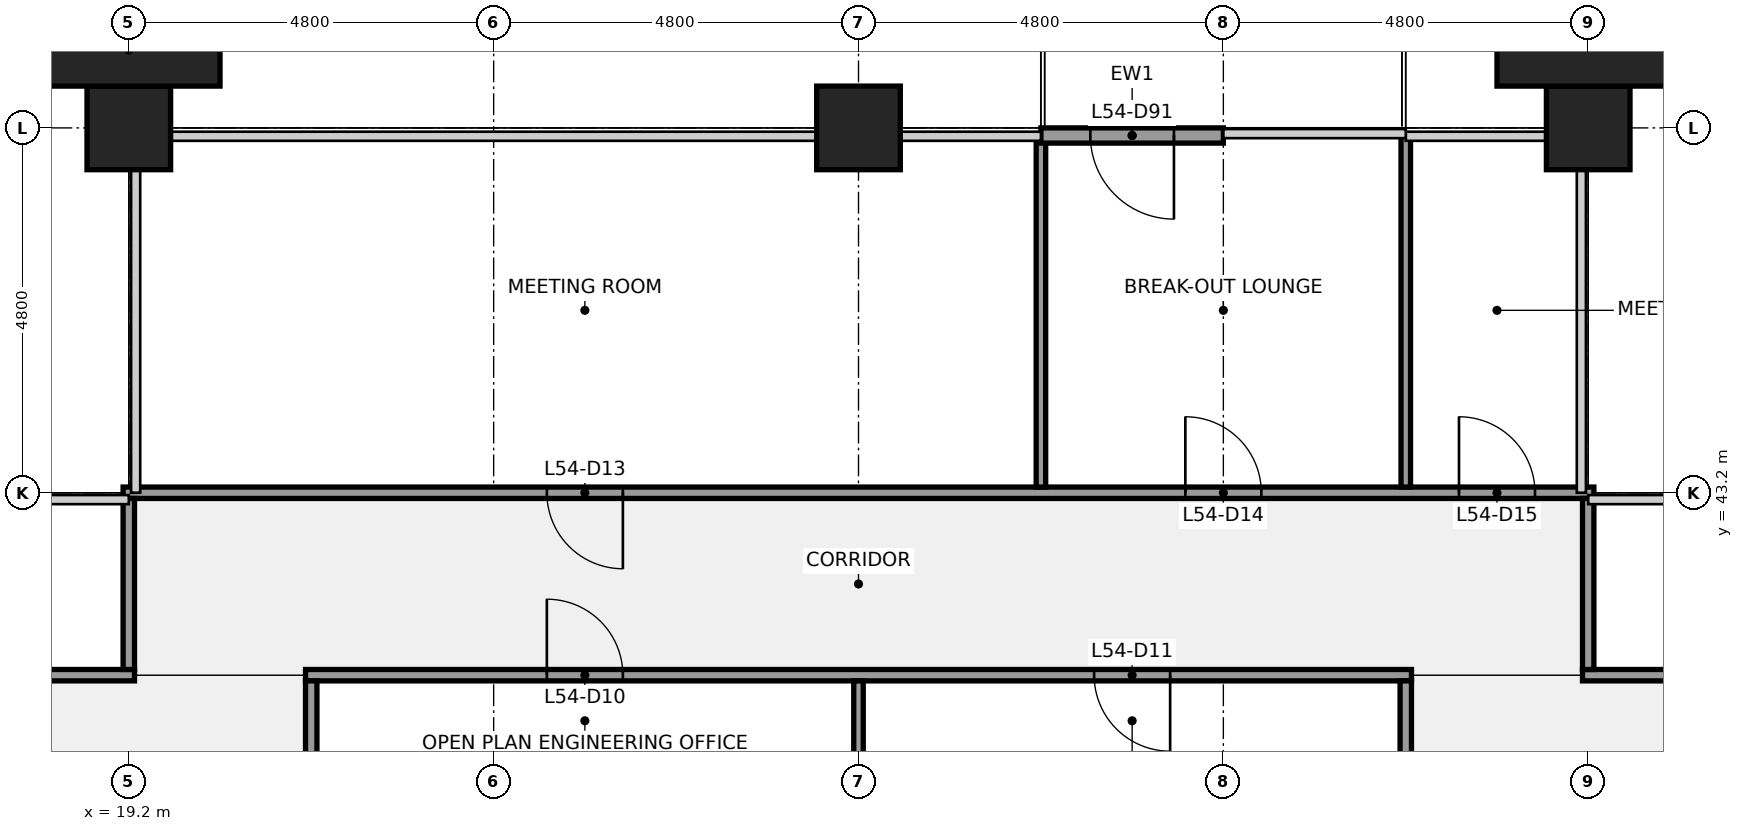
"""IFC4 building model, lengths in metres.
Left out: names, types, materials, properties, quantities, classifications, styles, units other than length and angle.
Written with IfcOpenShell. Run it as: python <this file> out.ifc"""

import sys

from ifc_helpers import new_model, si_unit, direction, frame, frame_2d, origin, origin_2d, place, context, subcontext, project, spatial, rectangle, extrude, element, fill, save


model = new_model("IFC4")
c1 = context("Model", 3, precision=1e-05, world=origin(), true_north=direction((0.0, 1.0)))
c2 = subcontext(c1, "Body", "Model", "MODEL_VIEW")
j1 = project(units=[si_unit("LENGTHUNIT", "METRE"), si_unit("PLANEANGLEUNIT", "RADIAN")], contexts=[c1])
p1 = place(None, origin())
s1 = spatial("IfcSite", under=j1, at=p1, CompositionType="ELEMENT")
p2 = place(p1, origin())
s2 = spatial("IfcBuilding", under=s1, at=p2, CompositionType="ELEMENT")
p3 = place(p2, frame((0.0, 0.0, 245.2)))
s3 = spatial("IfcBuildingStorey", under=s2, at=p3, CompositionType="ELEMENT", Elevation=245.2)
for number, where, z_axis, x_axis in (
    (1, (19.2, 48.0, 0.0), (0.0, 0.0, 1.0), (1.0, 0.0, 0.0)),
    (2, (28.8, 48.0, 0.0), (0.0, 0.0, 1.0), (1.0, 0.0, 0.0)),
    (3, (38.4, 48.0, 0.0), (0.0, 0.0, 1.0), (1.0, 0.0, 0.0)),
):
    element("IfcColumn", number, at=place(p3, frame(where, z_axis=z_axis, x_axis=x_axis)), inside=s3, PredefinedType="COLUMN", context=c2, shape_type="SweptSolid", body=[
        extrude(rectangle(XDim=1.1, YDim=1.1, at=origin_2d()), origin(), (0.0, 0.0, 1.0), 4.0),
    ])
p4 = place(p3, frame((14.325, 40.8, 0.0), z_axis=(0.0, 0.0, 1.0), x_axis=(1.0, 0.0, 0.0)))
e4 = element("IfcWall", 4, at=p4, inside=s3, PredefinedType="PARTITIONING", context=c2, shape_type="SweptSolid", body=[
    extrude(rectangle(XDim=4.95, YDim=0.15, at=frame_2d((2.475, 0.0))), origin(), (0.0, 0.0, 1.0), 2.87),
])
p5 = place(p4, frame((1.975, 0.0, 0.0)))
e5 = element("IfcOpeningElement", 5, at=p5, cuts=e4, PredefinedType="OPENING", context=c2, shape_type="SweptSolid", body=[
    extrude(rectangle(XDim=1.0, YDim=2.1, at=frame_2d((0.5, 1.05))), frame((0.0, 0.085, 0.0), z_axis=(0.0, -1.0, 0.0), x_axis=(1.0, 0.0, 0.0)), (0.0, 0.0, 1.0), 0.17),
])
p6 = place(p3, frame((21.525, 40.8, 0.0), z_axis=(0.0, 0.0, 1.0), x_axis=(1.0, 0.0, 0.0)))
e6 = element("IfcWall", 6, at=p6, inside=s3, PredefinedType="PARTITIONING", context=c2, shape_type="SweptSolid", body=[
    extrude(rectangle(XDim=14.55, YDim=0.15, at=frame_2d((7.275, 0.0))), origin(), (0.0, 0.0, 1.0), 2.87),
])
p7 = place(p6, frame((3.175, 0.0, 0.0)))
e7 = element("IfcOpeningElement", 7, at=p7, cuts=e6, PredefinedType="OPENING", context=c2, shape_type="SweptSolid", body=[
    extrude(rectangle(XDim=1.0, YDim=2.1, at=frame_2d((0.5, 1.05))), frame((0.0, 0.085, 0.0), z_axis=(0.0, -1.0, 0.0), x_axis=(1.0, 0.0, 0.0)), (0.0, 0.0, 1.0), 0.17),
])
p8 = place(p6, frame((10.375, 0.0, 0.0)))
e8 = element("IfcOpeningElement", 8, at=p8, cuts=e6, PredefinedType="OPENING", context=c2, shape_type="SweptSolid", body=[
    extrude(rectangle(XDim=1.0, YDim=2.1, at=frame_2d((0.5, 1.05))), frame((0.0, 0.085, 0.0), z_axis=(0.0, -1.0, 0.0), x_axis=(1.0, 0.0, 0.0)), (0.0, 0.0, 1.0), 0.17),
])
p9 = place(p3, frame((38.325, 40.8, 0.0), z_axis=(0.0, 0.0, 1.0), x_axis=(1.0, 0.0, 0.0)))
e9 = element("IfcWall", 9, at=p9, inside=s3, PredefinedType="PARTITIONING", context=c2, shape_type="SweptSolid", body=[
    extrude(rectangle(XDim=4.95, YDim=0.15, at=frame_2d((2.475, 0.0))), origin(), (0.0, 0.0, 1.0), 2.87),
])
p10 = place(p9, frame((1.975, 0.0, 0.0)))
e10 = element("IfcOpeningElement", 10, at=p10, cuts=e9, PredefinedType="OPENING", context=c2, shape_type="SweptSolid", body=[
    extrude(rectangle(XDim=1.0, YDim=2.1, at=frame_2d((0.5, 1.05))), frame((0.0, 0.085, 0.0), z_axis=(0.0, -1.0, 0.0), x_axis=(1.0, 0.0, 0.0)), (0.0, 0.0, 1.0), 0.17),
])
p11 = place(p3, frame((19.125, 43.2, 0.0), z_axis=(0.0, 0.0, 1.0), x_axis=(1.0, 0.0, 0.0)))
e11 = element("IfcWall", 11, at=p11, inside=s3, PredefinedType="PARTITIONING", context=c2, shape_type="SweptSolid", body=[
    extrude(rectangle(XDim=19.35, YDim=0.15, at=frame_2d((9.675, 0.0))), origin(), (0.0, 0.0, 1.0), 2.87),
])
p12 = place(p11, frame((5.575, 0.0, 0.0)))
e12 = element("IfcOpeningElement", 12, at=p12, cuts=e11, PredefinedType="OPENING", context=c2, shape_type="SweptSolid", body=[
    extrude(rectangle(XDim=1.0, YDim=2.1, at=frame_2d((0.5, 1.05))), frame((0.0, 0.085, 0.0), z_axis=(0.0, -1.0, 0.0), x_axis=(1.0, 0.0, 0.0)), (0.0, 0.0, 1.0), 0.17),
])
p13 = place(p11, frame((13.975, 0.0, 0.0)))
e13 = element("IfcOpeningElement", 13, at=p13, cuts=e11, PredefinedType="OPENING", context=c2, shape_type="SweptSolid", body=[
    extrude(rectangle(XDim=1.0, YDim=2.1, at=frame_2d((0.5, 1.05))), frame((0.0, 0.085, 0.0), z_axis=(0.0, -1.0, 0.0), x_axis=(1.0, 0.0, 0.0)), (0.0, 0.0, 1.0), 0.17),
])
p14 = place(p11, frame((17.575, 0.0, 0.0)))
e14 = element("IfcOpeningElement", 14, at=p14, cuts=e11, PredefinedType="OPENING", context=c2, shape_type="SweptSolid", body=[
    extrude(rectangle(XDim=1.0, YDim=2.1, at=frame_2d((0.5, 1.05))), frame((0.0, 0.085, 0.0), z_axis=(0.0, -1.0, 0.0), x_axis=(1.0, 0.0, 0.0)), (0.0, 0.0, 1.0), 0.17),
])
p15 = place(p3, frame((19.2, 40.875, 0.0), z_axis=(0.0, 0.0, 1.0), x_axis=(0.0, 1.0, 0.0)))
e15 = element("IfcWall", 15, at=p15, inside=s3, PredefinedType="PARTITIONING", context=c2, shape_type="SweptSolid", body=[
    extrude(rectangle(XDim=2.25, YDim=0.15, at=frame_2d((1.125, 0.0))), origin(), (0.0, 0.0, 1.0), 2.87),
])
p16 = place(p3, frame((21.6, 39.663, 0.0), z_axis=(0.0, 0.0, 1.0), x_axis=(0.0, 1.0, 0.0)))
e16 = element("IfcWall", 16, at=p16, inside=s3, PredefinedType="PARTITIONING", context=c2, shape_type="SweptSolid", body=[
    extrude(rectangle(XDim=1.062, YDim=0.15, at=frame_2d((0.531, 0.0))), origin(), (0.0, 0.0, 1.0), 2.87),
])
p17 = place(p3, frame((28.8, 39.663, 0.0), z_axis=(0.0, 0.0, 1.0), x_axis=(0.0, 1.0, 0.0)))
e17 = element("IfcWall", 17, at=p17, inside=s3, PredefinedType="PARTITIONING", context=c2, shape_type="SweptSolid", body=[
    extrude(rectangle(XDim=1.062, YDim=0.125, at=frame_2d((0.531, 0.0))), origin(), (0.0, 0.0, 1.0), 2.87),
])
for number, where, z_axis, x_axis in (
    (18, (31.2, 43.275, 0.0), (0.0, 0.0, 1.0), (0.0, 1.0, 0.0)),
    (19, (36.0, 43.275, 0.0), (0.0, 0.0, 1.0), (0.0, 1.0, 0.0)),
):
    element("IfcWall", number, at=place(p3, frame(where, z_axis=z_axis, x_axis=x_axis)), inside=s3, PredefinedType="PARTITIONING", context=c2, shape_type="SweptSolid", body=[
        extrude(rectangle(XDim=4.625, YDim=0.125, at=frame_2d((2.312, 0.0))), origin(), (0.0, 0.0, 1.0), 2.87),
    ])
p18 = place(p3, frame((36.0, 39.663, 0.0), z_axis=(0.0, 0.0, 1.0), x_axis=(0.0, 1.0, 0.0)))
e20 = element("IfcWall", 20, at=p18, inside=s3, PredefinedType="PARTITIONING", context=c2, shape_type="SweptSolid", body=[
    extrude(rectangle(XDim=1.062, YDim=0.15, at=frame_2d((0.531, 0.0))), origin(), (0.0, 0.0, 1.0), 2.87),
])
p19 = place(p3, frame((38.4, 40.875, 0.0), z_axis=(0.0, 0.0, 1.0), x_axis=(0.0, 1.0, 0.0)))
e21 = element("IfcWall", 21, at=p19, inside=s3, PredefinedType="PARTITIONING", context=c2, shape_type="SweptSolid", body=[
    extrude(rectangle(XDim=2.25, YDim=0.15, at=frame_2d((1.125, 0.0))), origin(), (0.0, 0.0, 1.0), 2.87),
])
p20 = place(p3, frame((33.6, 47.9, 0.0), z_axis=(0.0, 0.0, 1.0), x_axis=(-1.0, 0.0, 0.0)))
e22 = element("IfcWall", 22, at=p20, inside=s3, PredefinedType="SOLIDWALL", context=c2, shape_type="SweptSolid", body=[
    extrude(rectangle(XDim=2.4, YDim=0.2, at=frame_2d((1.2, 0.0))), origin(), (0.0, 0.0, 1.0), 3.314),
])
p21 = place(p20, frame((0.65, 0.0, 0.0)))
e23 = element("IfcOpeningElement", 23, at=p21, cuts=e22, PredefinedType="OPENING", context=c2, shape_type="SweptSolid", body=[
    extrude(rectangle(XDim=1.1, YDim=2.1, at=frame_2d((0.55, 1.05))), frame((0.0, 0.11, 0.0), z_axis=(0.0, -1.0, 0.0), x_axis=(1.0, 0.0, 0.0)), (0.0, 0.0, 1.0), 0.22),
])
for number, where, z_axis, x_axis in (
    (24, (19.2, 49.025, 0.0), (0.0, 0.0, 1.0), (1.0, 0.0, 0.0)),
    (25, (38.4, 49.025, 0.0), (0.0, 0.0, 1.0), (1.0, 0.0, 0.0)),
):
    element("IfcColumn", number, at=place(p3, frame(where, z_axis=z_axis, x_axis=x_axis)), inside=s3, PredefinedType="PILASTER", context=c2, shape_type="SweptSolid", body=[
        extrude(rectangle(XDim=2.4, YDim=0.95, at=origin_2d()), origin(), (0.0, 0.0, 1.0), 4.0),
    ])
p22 = place(p7, origin())
e26 = element("IfcDoor", 26, at=p22, inside=s3, OperationType="SINGLE_SWING_LEFT", PredefinedType="DOOR", context=c2, shape_type="SweptSolid", body=[
    extrude(rectangle(XDim=1.0, YDim=2.1, at=frame_2d((0.5, 1.05))), frame((0.0, 0.025, 0.0), z_axis=(0.0, -1.0, 0.0), x_axis=(1.0, 0.0, 0.0)), (0.0, 0.0, 1.0), 0.05),
])
fill(e7, e26)
p23 = place(p8, origin())
e27 = element("IfcDoor", 27, at=p23, inside=s3, OperationType="SINGLE_SWING_RIGHT", PredefinedType="DOOR", context=c2, shape_type="SweptSolid", body=[
    extrude(rectangle(XDim=1.0, YDim=2.1, at=frame_2d((0.5, 1.05))), frame((0.0, 0.025, 0.0), z_axis=(0.0, -1.0, 0.0), x_axis=(1.0, 0.0, 0.0)), (0.0, 0.0, 1.0), 0.05),
])
fill(e8, e27)
p24 = place(p12, origin())
e28 = element("IfcDoor", 28, at=p24, inside=s3, OperationType="SINGLE_SWING_RIGHT", PredefinedType="DOOR", context=c2, shape_type="SweptSolid", body=[
    extrude(rectangle(XDim=1.0, YDim=2.1, at=frame_2d((0.5, 1.05))), frame((0.0, 0.025, 0.0), z_axis=(0.0, -1.0, 0.0), x_axis=(1.0, 0.0, 0.0)), (0.0, 0.0, 1.0), 0.05),
])
fill(e12, e28)
p25 = place(p13, origin())
e29 = element("IfcDoor", 29, at=p25, inside=s3, OperationType="SINGLE_SWING_LEFT", PredefinedType="DOOR", context=c2, shape_type="SweptSolid", body=[
    extrude(rectangle(XDim=1.0, YDim=2.1, at=frame_2d((0.5, 1.05))), frame((0.0, 0.025, 0.0), z_axis=(0.0, -1.0, 0.0), x_axis=(1.0, 0.0, 0.0)), (0.0, 0.0, 1.0), 0.05),
])
fill(e13, e29)
p26 = place(p14, origin())
e30 = element("IfcDoor", 30, at=p26, inside=s3, OperationType="SINGLE_SWING_LEFT", PredefinedType="DOOR", context=c2, shape_type="SweptSolid", body=[
    extrude(rectangle(XDim=1.0, YDim=2.1, at=frame_2d((0.5, 1.05))), frame((0.0, 0.025, 0.0), z_axis=(0.0, -1.0, 0.0), x_axis=(1.0, 0.0, 0.0)), (0.0, 0.0, 1.0), 0.05),
])
fill(e14, e30)
p27 = place(p21, origin())
e31 = element("IfcDoor", 31, at=p27, inside=s3, OperationType="SINGLE_SWING_LEFT", PredefinedType="DOOR", context=c2, shape_type="SweptSolid", body=[
    extrude(rectangle(XDim=1.1, YDim=2.1, at=frame_2d((0.55, 1.05))), frame((0.0, 0.025, 0.0), z_axis=(0.0, -1.0, 0.0), x_axis=(1.0, 0.0, 0.0)), (0.0, 0.0, 1.0), 0.05),
])
fill(e23, e31)
save(model, sys.argv[1])
